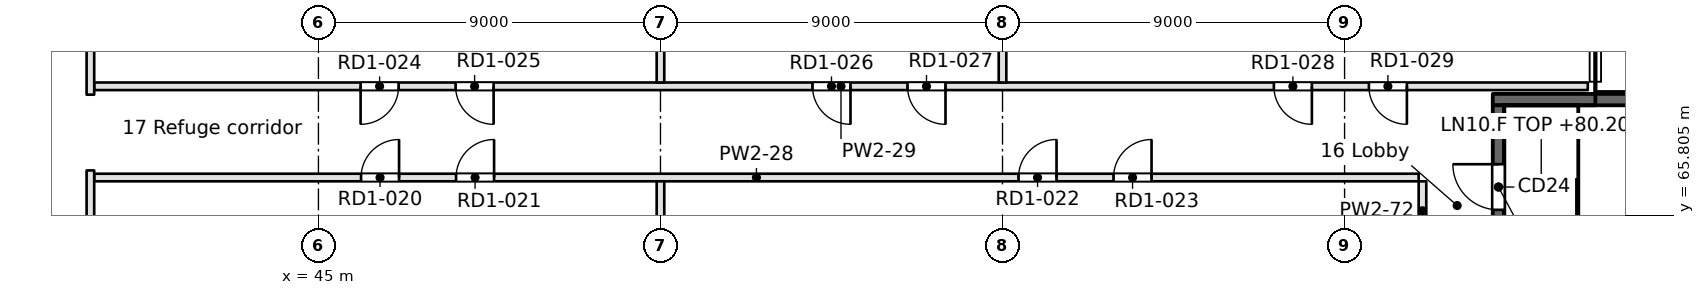
"""IFC4 building model, lengths in metres.
Left out: names, types, materials, properties, quantities, classifications, styles, units other than length and angle.
Written with IfcOpenShell. Run it as: python <this file> out.ifc"""

import sys

from ifc_helpers import new_model, si_unit, direction, frame, frame_2d, origin, place, context, subcontext, project, spatial, rectangle, extrude, element, fill, save


model = new_model("IFC4")
c1 = context("Model", 3, precision=1e-05, world=origin(), true_north=direction((0.0, 1.0)))
c2 = subcontext(c1, "Body", "Model", "MODEL_VIEW")
j1 = project(units=[si_unit("LENGTHUNIT", "METRE"), si_unit("PLANEANGLEUNIT", "RADIAN")], contexts=[c1])
p1 = place(None, origin())
s1 = spatial("IfcSite", under=j1, at=p1, CompositionType="ELEMENT")
p2 = place(p1, origin())
s2 = spatial("IfcBuilding", under=s1, at=p2, CompositionType="ELEMENT")
p3 = place(p2, frame((0.0, 0.0, 80.2)))
s3 = spatial("IfcBuildingStorey", under=s2, at=p3, CompositionType="ELEMENT", Elevation=80.2)
p4 = place(p3, frame((75.9, 68.85, -0.45), z_axis=(0.0, 0.0, 1.0), x_axis=(1.0, 0.0, 0.0)))
e1 = element("IfcWall", 1, at=p4, inside=s3, PredefinedType="SOLIDWALL", context=c2, shape_type="SweptSolid", body=[
    extrude(rectangle(XDim=8.2, YDim=0.3, at=frame_2d((4.1, 0.0))), origin(), (0.0, 0.0, 1.0), 4.65),
])
p5 = place(p3, frame((76.05, 64.4, -0.45), z_axis=(0.0, 0.0, 1.0), x_axis=(0.0, 1.0, 0.0)))
e2 = element("IfcWall", 2, at=p5, inside=s3, PredefinedType="SOLIDWALL", context=c2, shape_type="SweptSolid", body=[
    extrude(rectangle(XDim=4.3, YDim=0.3, at=frame_2d((2.15, 0.0))), origin(), (0.0, 0.0, 1.0), 4.65),
])
p6 = place(p5, frame((1.55, 0.0, 0.45)))
e3 = element("IfcOpeningElement", 3, at=p6, cuts=e2, PredefinedType="OPENING", context=c2, shape_type="SweptSolid", body=[
    extrude(rectangle(XDim=1.2, YDim=2.1, at=frame_2d((0.6, 1.05))), frame((0.0, 0.15, 0.0), z_axis=(0.0, -1.0, 0.0), x_axis=(1.0, 0.0, 0.0)), (0.0, 0.0, 1.0), 0.3),
])
p7 = place(p3, frame((73.95, 66.8, 0.0), z_axis=(0.0, 0.0, 1.0), x_axis=(-1.0, 0.0, 0.0)))
e4 = element("IfcWall", 4, at=p7, inside=s3, PredefinedType="PARTITIONING", context=c2, shape_type="SweptSolid", body=[
    extrude(rectangle(XDim=34.85, YDim=0.2, at=frame_2d((17.425, 0.0))), origin(), (0.0, 0.0, 1.0), 4.2),
])
p8 = place(p7, frame((26.828, 0.0, 0.0)))
e5 = element("IfcOpeningElement", 5, at=p8, cuts=e4, PredefinedType="OPENING", context=c2, shape_type="SweptSolid", body=[
    extrude(rectangle(XDim=1.0, YDim=2.1, at=frame_2d((0.5, 1.05))), frame((0.0, 0.1, 0.0), z_axis=(0.0, -1.0, 0.0), x_axis=(1.0, 0.0, 0.0)), (0.0, 0.0, 1.0), 0.2),
])
p9 = place(p7, frame((24.328, 0.0, 0.0)))
e6 = element("IfcOpeningElement", 6, at=p9, cuts=e4, PredefinedType="OPENING", context=c2, shape_type="SweptSolid", body=[
    extrude(rectangle(XDim=1.0, YDim=2.1, at=frame_2d((0.5, 1.05))), frame((0.0, 0.1, 0.0), z_axis=(0.0, -1.0, 0.0), x_axis=(1.0, 0.0, 0.0)), (0.0, 0.0, 1.0), 0.2),
])
p10 = place(p7, frame((9.529, 0.0, 0.0)))
e7 = element("IfcOpeningElement", 7, at=p10, cuts=e4, PredefinedType="OPENING", context=c2, shape_type="SweptSolid", body=[
    extrude(rectangle(XDim=1.0, YDim=2.1, at=frame_2d((0.5, 1.05))), frame((0.0, 0.1, 0.0), z_axis=(0.0, -1.0, 0.0), x_axis=(1.0, 0.0, 0.0)), (0.0, 0.0, 1.0), 0.2),
])
p11 = place(p7, frame((7.029, 0.0, 0.0)))
e8 = element("IfcOpeningElement", 8, at=p11, cuts=e4, PredefinedType="OPENING", context=c2, shape_type="SweptSolid", body=[
    extrude(rectangle(XDim=1.0, YDim=2.1, at=frame_2d((0.5, 1.05))), frame((0.0, 0.1, 0.0), z_axis=(0.0, -1.0, 0.0), x_axis=(1.0, 0.0, 0.0)), (0.0, 0.0, 1.0), 0.2),
])
p12 = place(p3, frame((39.1, 69.2, 0.0), z_axis=(0.0, 0.0, 1.0), x_axis=(1.0, 0.0, 0.0)))
e9 = element("IfcWall", 9, at=p12, inside=s3, PredefinedType="PARTITIONING", context=c2, shape_type="SweptSolid", body=[
    extrude(rectangle(XDim=39.3, YDim=0.2, at=frame_2d((19.65, 0.0))), origin(), (0.0, 0.0, 1.0), 4.2),
])
p13 = place(p12, frame((7.01, 0.0, 0.0)))
e10 = element("IfcOpeningElement", 10, at=p13, cuts=e9, PredefinedType="OPENING", context=c2, shape_type="SweptSolid", body=[
    extrude(rectangle(XDim=1.0, YDim=2.1, at=frame_2d((0.5, 1.05))), frame((0.0, 0.1, 0.0), z_axis=(0.0, -1.0, 0.0), x_axis=(1.0, 0.0, 0.0)), (0.0, 0.0, 1.0), 0.2),
])
p14 = place(p12, frame((9.51, 0.0, 0.0)))
e11 = element("IfcOpeningElement", 11, at=p14, cuts=e9, PredefinedType="OPENING", context=c2, shape_type="SweptSolid", body=[
    extrude(rectangle(XDim=1.0, YDim=2.1, at=frame_2d((0.5, 1.05))), frame((0.0, 0.1, 0.0), z_axis=(0.0, -1.0, 0.0), x_axis=(1.0, 0.0, 0.0)), (0.0, 0.0, 1.0), 0.2),
])
p15 = place(p12, frame((18.9, 0.0, 0.0)))
e12 = element("IfcOpeningElement", 12, at=p15, cuts=e9, PredefinedType="OPENING", context=c2, shape_type="SweptSolid", body=[
    extrude(rectangle(XDim=1.0, YDim=2.1, at=frame_2d((0.5, 1.05))), frame((0.0, 0.1, 0.0), z_axis=(0.0, -1.0, 0.0), x_axis=(1.0, 0.0, 0.0)), (0.0, 0.0, 1.0), 0.2),
])
p16 = place(p12, frame((21.4, 0.0, 0.0)))
e13 = element("IfcOpeningElement", 13, at=p16, cuts=e9, PredefinedType="OPENING", context=c2, shape_type="SweptSolid", body=[
    extrude(rectangle(XDim=1.0, YDim=2.1, at=frame_2d((0.5, 1.05))), frame((0.0, 0.1, 0.0), z_axis=(0.0, -1.0, 0.0), x_axis=(1.0, 0.0, 0.0)), (0.0, 0.0, 1.0), 0.2),
])
p17 = place(p12, frame((31.04, 0.0, 0.0)))
e14 = element("IfcOpeningElement", 14, at=p17, cuts=e9, PredefinedType="OPENING", context=c2, shape_type="SweptSolid", body=[
    extrude(rectangle(XDim=1.0, YDim=2.1, at=frame_2d((0.5, 1.05))), frame((0.0, 0.1, 0.0), z_axis=(0.0, -1.0, 0.0), x_axis=(1.0, 0.0, 0.0)), (0.0, 0.0, 1.0), 0.2),
])
p18 = place(p12, frame((33.54, 0.0, 0.0)))
e15 = element("IfcOpeningElement", 15, at=p18, cuts=e9, PredefinedType="OPENING", context=c2, shape_type="SweptSolid", body=[
    extrude(rectangle(XDim=1.0, YDim=2.1, at=frame_2d((0.5, 1.05))), frame((0.0, 0.1, 0.0), z_axis=(0.0, -1.0, 0.0), x_axis=(1.0, 0.0, 0.0)), (0.0, 0.0, 1.0), 0.2),
])
p19 = place(p3, frame((39.0, 66.986, 0.0), z_axis=(0.0, 0.0, 1.0), x_axis=(0.0, -1.0, 0.0)))
e16 = element("IfcWall", 16, at=p19, inside=s3, PredefinedType="PARTITIONING", context=c2, shape_type="SweptSolid", body=[
    extrude(rectangle(XDim=3.886, YDim=0.2, at=frame_2d((1.943, 0.0))), origin(), (0.0, 0.0, 1.0), 4.2),
])
p20 = place(p3, frame((39.0, 89.9, 0.0), z_axis=(0.0, 0.0, 1.0), x_axis=(0.0, -1.0, 0.0)))
e17 = element("IfcWall", 17, at=p20, inside=s3, PredefinedType="PARTITIONING", context=c2, shape_type="SweptSolid", body=[
    extrude(rectangle(XDim=20.92, YDim=0.2, at=frame_2d((10.46, 0.0))), origin(), (0.0, 0.0, 1.0), 4.2),
])
p21 = place(p20, frame((3.533, 0.0, 0.0)))
e18 = element("IfcOpeningElement", 18, at=p21, cuts=e17, PredefinedType="OPENING", context=c2, shape_type="SweptSolid", body=[
    extrude(rectangle(XDim=1.0, YDim=2.1, at=frame_2d((0.5, 1.05))), frame((0.0, 0.1, 0.0), z_axis=(0.0, -1.0, 0.0), x_axis=(1.0, 0.0, 0.0)), (0.0, 0.0, 1.0), 0.2),
])
p22 = place(p3, frame((54.0, 66.7, 0.0), z_axis=(0.0, 0.0, 1.0), x_axis=(0.0, -1.0, 0.0)))
e19 = element("IfcWall", 19, at=p22, inside=s3, PredefinedType="PARTITIONING", context=c2, shape_type="SweptSolid", body=[
    extrude(rectangle(XDim=3.05, YDim=0.2, at=frame_2d((1.525, 0.0))), origin(), (0.0, 0.0, 1.0), 4.2),
])
for number, where, z_axis, x_axis in (
    (20, (54.0, 71.35, 0.0), (0.0, 0.0, 1.0), (0.0, -1.0, 0.0)),
    (21, (63.0, 71.35, 0.0), (0.0, 0.0, 1.0), (0.0, -1.0, 0.0)),
):
    element("IfcWall", number, at=place(p3, frame(where, z_axis=z_axis, x_axis=x_axis)), inside=s3, PredefinedType="PARTITIONING", context=c2, shape_type="SweptSolid", body=[
        extrude(rectangle(XDim=2.05, YDim=0.2, at=frame_2d((1.025, 0.0))), origin(), (0.0, 0.0, 1.0), 4.2),
    ])
p23 = place(p3, frame((74.05, 65.15, 0.0), z_axis=(0.0, 0.0, 1.0), x_axis=(0.0, 1.0, 0.0)))
e22 = element("IfcWall", 22, at=p23, inside=s3, PredefinedType="PARTITIONING", context=c2, shape_type="SweptSolid", body=[
    extrude(rectangle(XDim=1.55, YDim=0.2, at=frame_2d((0.775, 0.0))), origin(), (0.0, 0.0, 1.0), 4.2),
])
p24 = place(p6, origin())
e23 = element("IfcDoor", 23, at=p24, inside=s3, OperationType="SINGLE_SWING_RIGHT", PredefinedType="DOOR", context=c2, shape_type="SweptSolid", body=[
    extrude(rectangle(XDim=1.2, YDim=2.1, at=frame_2d((0.6, 1.05))), frame((0.0, 0.025, 0.0), z_axis=(0.0, -1.0, 0.0), x_axis=(1.0, 0.0, 0.0)), (0.0, 0.0, 1.0), 0.05),
])
fill(e3, e23)
p25 = place(p8, frame((1.0, 0.0, 0.0), z_axis=(0.0, 0.0, 1.0), x_axis=(-1.0, 0.0, 0.0)))
e24 = element("IfcDoor", 24, at=p25, inside=s3, OperationType="SINGLE_SWING_RIGHT", PredefinedType="DOOR", context=c2, shape_type="SweptSolid", body=[
    extrude(rectangle(XDim=1.0, YDim=2.1, at=frame_2d((0.5, 1.05))), frame((0.0, 0.025, 0.0), z_axis=(0.0, -1.0, 0.0), x_axis=(1.0, 0.0, 0.0)), (0.0, 0.0, 1.0), 0.05),
])
fill(e5, e24)
p26 = place(p9, frame((1.0, 0.0, 0.0), z_axis=(0.0, 0.0, 1.0), x_axis=(-1.0, 0.0, 0.0)))
e25 = element("IfcDoor", 25, at=p26, inside=s3, OperationType="SINGLE_SWING_RIGHT", PredefinedType="DOOR", context=c2, shape_type="SweptSolid", body=[
    extrude(rectangle(XDim=1.0, YDim=2.1, at=frame_2d((0.5, 1.05))), frame((0.0, 0.025, 0.0), z_axis=(0.0, -1.0, 0.0), x_axis=(1.0, 0.0, 0.0)), (0.0, 0.0, 1.0), 0.05),
])
fill(e6, e25)
p27 = place(p10, frame((1.0, 0.0, 0.0), z_axis=(0.0, 0.0, 1.0), x_axis=(-1.0, 0.0, 0.0)))
e26 = element("IfcDoor", 26, at=p27, inside=s3, OperationType="SINGLE_SWING_RIGHT", PredefinedType="DOOR", context=c2, shape_type="SweptSolid", body=[
    extrude(rectangle(XDim=1.0, YDim=2.1, at=frame_2d((0.5, 1.05))), frame((0.0, 0.025, 0.0), z_axis=(0.0, -1.0, 0.0), x_axis=(1.0, 0.0, 0.0)), (0.0, 0.0, 1.0), 0.05),
])
fill(e7, e26)
p28 = place(p11, frame((1.0, 0.0, 0.0), z_axis=(0.0, 0.0, 1.0), x_axis=(-1.0, 0.0, 0.0)))
e27 = element("IfcDoor", 27, at=p28, inside=s3, OperationType="SINGLE_SWING_RIGHT", PredefinedType="DOOR", context=c2, shape_type="SweptSolid", body=[
    extrude(rectangle(XDim=1.0, YDim=2.1, at=frame_2d((0.5, 1.05))), frame((0.0, 0.025, 0.0), z_axis=(0.0, -1.0, 0.0), x_axis=(1.0, 0.0, 0.0)), (0.0, 0.0, 1.0), 0.05),
])
fill(e8, e27)
p29 = place(p13, frame((1.0, 0.0, 0.0), z_axis=(0.0, 0.0, 1.0), x_axis=(-1.0, 0.0, 0.0)))
e28 = element("IfcDoor", 28, at=p29, inside=s3, OperationType="SINGLE_SWING_RIGHT", PredefinedType="DOOR", context=c2, shape_type="SweptSolid", body=[
    extrude(rectangle(XDim=1.0, YDim=2.1, at=frame_2d((0.5, 1.05))), frame((0.0, 0.025, 0.0), z_axis=(0.0, -1.0, 0.0), x_axis=(1.0, 0.0, 0.0)), (0.0, 0.0, 1.0), 0.05),
])
fill(e10, e28)
p30 = place(p14, frame((1.0, 0.0, 0.0), z_axis=(0.0, 0.0, 1.0), x_axis=(-1.0, 0.0, 0.0)))
e29 = element("IfcDoor", 29, at=p30, inside=s3, OperationType="SINGLE_SWING_LEFT", PredefinedType="DOOR", context=c2, shape_type="SweptSolid", body=[
    extrude(rectangle(XDim=1.0, YDim=2.1, at=frame_2d((0.5, 1.05))), frame((0.0, 0.025, 0.0), z_axis=(0.0, -1.0, 0.0), x_axis=(1.0, 0.0, 0.0)), (0.0, 0.0, 1.0), 0.05),
])
fill(e11, e29)
p31 = place(p15, frame((1.0, 0.0, 0.0), z_axis=(0.0, 0.0, 1.0), x_axis=(-1.0, 0.0, 0.0)))
e30 = element("IfcDoor", 30, at=p31, inside=s3, OperationType="SINGLE_SWING_LEFT", PredefinedType="DOOR", context=c2, shape_type="SweptSolid", body=[
    extrude(rectangle(XDim=1.0, YDim=2.1, at=frame_2d((0.5, 1.05))), frame((0.0, 0.025, 0.0), z_axis=(0.0, -1.0, 0.0), x_axis=(1.0, 0.0, 0.0)), (0.0, 0.0, 1.0), 0.05),
])
fill(e12, e30)
p32 = place(p16, frame((1.0, 0.0, 0.0), z_axis=(0.0, 0.0, 1.0), x_axis=(-1.0, 0.0, 0.0)))
e31 = element("IfcDoor", 31, at=p32, inside=s3, OperationType="SINGLE_SWING_LEFT", PredefinedType="DOOR", context=c2, shape_type="SweptSolid", body=[
    extrude(rectangle(XDim=1.0, YDim=2.1, at=frame_2d((0.5, 1.05))), frame((0.0, 0.025, 0.0), z_axis=(0.0, -1.0, 0.0), x_axis=(1.0, 0.0, 0.0)), (0.0, 0.0, 1.0), 0.05),
])
fill(e13, e31)
p33 = place(p17, frame((1.0, 0.0, 0.0), z_axis=(0.0, 0.0, 1.0), x_axis=(-1.0, 0.0, 0.0)))
e32 = element("IfcDoor", 32, at=p33, inside=s3, OperationType="SINGLE_SWING_LEFT", PredefinedType="DOOR", context=c2, shape_type="SweptSolid", body=[
    extrude(rectangle(XDim=1.0, YDim=2.1, at=frame_2d((0.5, 1.05))), frame((0.0, 0.025, 0.0), z_axis=(0.0, -1.0, 0.0), x_axis=(1.0, 0.0, 0.0)), (0.0, 0.0, 1.0), 0.05),
])
fill(e14, e32)
p34 = place(p18, frame((1.0, 0.0, 0.0), z_axis=(0.0, 0.0, 1.0), x_axis=(-1.0, 0.0, 0.0)))
e33 = element("IfcDoor", 33, at=p34, inside=s3, OperationType="SINGLE_SWING_LEFT", PredefinedType="DOOR", context=c2, shape_type="SweptSolid", body=[
    extrude(rectangle(XDim=1.0, YDim=2.1, at=frame_2d((0.5, 1.05))), frame((0.0, 0.025, 0.0), z_axis=(0.0, -1.0, 0.0), x_axis=(1.0, 0.0, 0.0)), (0.0, 0.0, 1.0), 0.05),
])
fill(e15, e33)
save(model, sys.argv[1])
